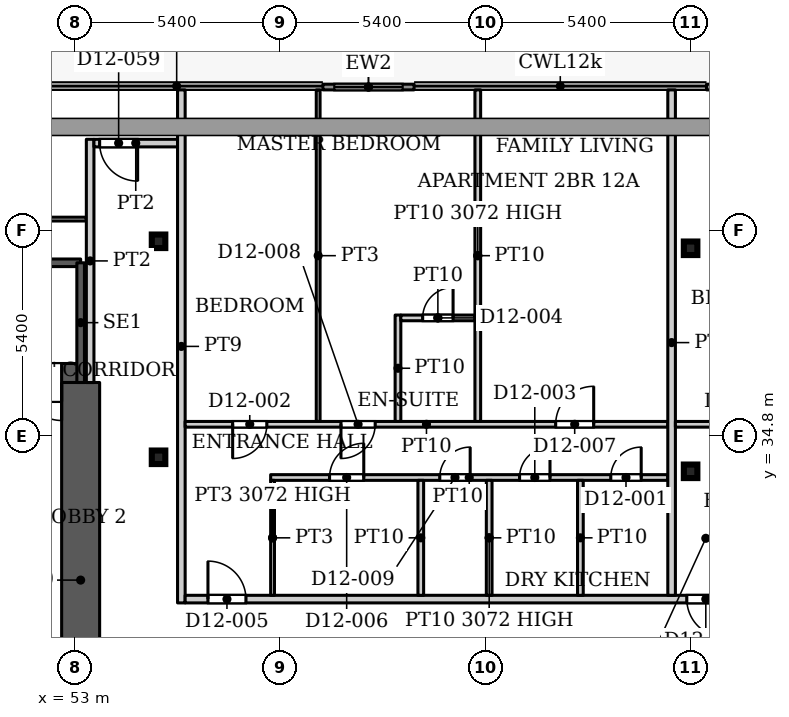
"""IFC4 building model, lengths in metres.
Left out: names, types, materials, properties, quantities, classifications, styles, units other than length and angle.
Written with IfcOpenShell. Run it as: python <this file> out.ifc"""

import sys

from ifc_helpers import new_model, si_unit, direction, frame, frame_2d, origin, origin_2d, place, context, subcontext, project, spatial, rectangle, hollow_rectangle, extrude, source, transform, mapped, element, fill, save


model = new_model("IFC4")
c1 = context("Model", 3, precision=1e-05, world=origin(), true_north=direction((0.0, 1.0)))
c2 = subcontext(c1, "Body", "Model", "MODEL_VIEW")
j1 = project(units=[si_unit("LENGTHUNIT", "METRE"), si_unit("PLANEANGLEUNIT", "RADIAN")], contexts=[c1])
p1 = place(None, origin())
s1 = spatial("IfcSite", under=j1, at=p1, CompositionType="ELEMENT")
p2 = place(p1, origin())
s2 = spatial("IfcBuilding", under=s1, at=p2, CompositionType="ELEMENT")
p3 = place(p2, frame((0.0, 0.0, 53.9)))
s3 = spatial("IfcBuildingStorey", under=s2, at=p3, CompositionType="ELEMENT", Elevation=53.9)
for number, where, z_axis, x_axis in (
    (1, (69.2, 33.863, 0.0), (0.0, 0.0, 1.0), (1.0, 0.0, 0.0)),
    (2, (55.2, 34.232, 0.0), (0.0, 0.0, 1.0), (1.0, 0.0, 0.0)),
    (3, (69.2, 39.732, 0.0), (0.0, 0.0, 1.0), (1.0, 0.0, 0.0)),
    (4, (55.2, 39.916, 0.0), (0.0, 0.0, 1.0), (1.0, 0.0, 0.0)),
):
    element("IfcColumn", number, at=place(p3, frame(where, z_axis=z_axis, x_axis=x_axis)), inside=s3, PredefinedType="COLUMN", context=c2, shape_type="SweptSolid", body=[
        extrude(hollow_rectangle(XDim=0.356, YDim=0.356, WallThickness=0.016, InnerFilletRadius=0.016, OuterFilletRadius=0.032, at=origin_2d()), origin(), (0.0, 0.0, 1.0), 3.9),
    ])
p4 = place(p3, frame((34.75, 36.2, 0.0), z_axis=(0.0, 0.0, 1.0), x_axis=(1.0, 0.0, 0.0)))
e5 = element("IfcWall", 5, at=p4, inside=s3, PredefinedType="SHEAR", context=c2, shape_type="SweptSolid", body=[
    extrude(rectangle(XDim=18.4, YDim=1.0, at=frame_2d((9.2, 0.0))), origin(), (0.0, 0.0, 1.0), 3.9),
])
p5 = place(p4, frame((16.9, 0.0, 0.0)))
e6 = element("IfcOpeningElement", 6, at=p5, cuts=e5, PredefinedType="OPENING", context=c2, shape_type="SweptSolid", body=[
    extrude(rectangle(XDim=1.0, YDim=2.2, at=frame_2d((0.5, 1.1))), frame((0.0, 0.51, 0.0), z_axis=(0.0, -1.0, 0.0), x_axis=(1.0, 0.0, 0.0)), (0.0, 0.0, 1.0), 1.02),
])
p6 = place(p3, frame((53.15, 25.8, 0.0), z_axis=(0.0, 0.0, 1.0), x_axis=(0.0, 1.0, 0.0)))
e7 = element("IfcWall", 7, at=p6, inside=s3, PredefinedType="SHEAR", context=c2, shape_type="SweptSolid", body=[
    extrude(rectangle(XDim=10.4, YDim=1.0, at=frame_2d((5.2, 0.0))), origin(), (0.0, 0.0, 1.0), 3.9),
])
p7 = place(p3, frame((59.524, 43.975, 0.0), z_axis=(0.0, 0.0, 1.0), x_axis=(1.0, 0.0, 0.0)))
e8 = element("IfcWall", 8, at=p7, inside=s3, PredefinedType="SOLIDWALL", context=c2, shape_type="SweptSolid", body=[
    extrude(rectangle(XDim=2.4, YDim=0.15, at=frame_2d((1.2, 0.0))), origin(), (0.0, 0.0, 1.0), 3.75),
])
p8 = place(p7, frame((0.3, 0.0, 0.0)))
e9 = element("IfcOpeningElement", 9, at=p8, cuts=e8, PredefinedType="OPENING", context=c2, shape_type="SweptSolid", body=[
    extrude(rectangle(XDim=1.8, YDim=2.4, at=frame_2d((0.9, 1.2))), frame((0.0, 0.085, 0.0), z_axis=(0.0, -1.0, 0.0), x_axis=(1.0, 0.0, 0.0)), (0.0, 0.0, 1.0), 0.17),
])
p9 = place(p3, frame((69.618, 43.975, 0.0), z_axis=(0.0, 0.0, 1.0), x_axis=(1.0, 0.0, 0.0)))
e10 = element("IfcWall", 10, at=p9, inside=s3, PredefinedType="SOLIDWALL", context=c2, shape_type="SweptSolid", body=[
    extrude(rectangle(XDim=2.4, YDim=0.15, at=frame_2d((1.2, 0.0))), origin(), (0.0, 0.0, 1.0), 3.75),
])
p10 = place(p9, frame((0.3, 0.0, 0.0)))
e11 = element("IfcOpeningElement", 11, at=p10, cuts=e10, PredefinedType="OPENING", context=c2, shape_type="SweptSolid", body=[
    extrude(rectangle(XDim=1.8, YDim=2.4, at=frame_2d((0.9, 1.2))), frame((0.0, 0.085, 0.0), z_axis=(0.0, -1.0, 0.0), x_axis=(1.0, 0.0, 0.0)), (0.0, 0.0, 1.0), 0.17),
])
p11 = place(p3, frame((43.99, 39.35, 0.0), z_axis=(0.0, 0.0, 1.0), x_axis=(1.0, 0.0, 0.0)))
e12 = element("IfcWall", 12, at=p11, inside=s3, PredefinedType="SHEAR", context=c2, shape_type="SweptSolid", body=[
    extrude(rectangle(XDim=9.16, YDim=0.2, at=frame_2d((4.58, 0.0))), origin(), (0.0, 0.0, 1.0), 3.9),
])
p12 = place(p3, frame((53.15, 36.2, 0.0), z_axis=(0.0, 0.0, 1.0), x_axis=(0.0, 1.0, 0.0)))
e13 = element("IfcWall", 13, at=p12, inside=s3, PredefinedType="SHEAR", context=c2, shape_type="SweptSolid", body=[
    extrude(rectangle(XDim=3.15, YDim=0.2, at=frame_2d((1.575, 0.0))), origin(), (0.0, 0.0, 1.0), 3.9),
])
p13 = place(p3, frame((38.499, 40.5, 0.0), z_axis=(0.0, 0.0, 1.0), x_axis=(1.0, 0.0, 0.0)))
e14 = element("IfcWall", 14, at=p13, inside=s3, PredefinedType="PARTITIONING", context=c2, shape_type="SweptSolid", body=[
    extrude(rectangle(XDim=14.801, YDim=0.1, at=frame_2d((7.4, 0.0))), origin(), (0.0, 0.0, 1.0), 3.6),
])
p14 = place(p13, frame((6.701, 0.0, 0.0)))
e15 = element("IfcOpeningElement", 15, at=p14, cuts=e14, PredefinedType="OPENING", context=c2, shape_type="SweptSolid", body=[
    extrude(rectangle(XDim=1.0, YDim=2.1, at=frame_2d((0.5, 1.05))), frame((0.0, 0.06, 0.0), z_axis=(0.0, -1.0, 0.0), x_axis=(1.0, 0.0, 0.0)), (0.0, 0.0, 1.0), 0.12),
])
p15 = place(p3, frame((53.4, 36.199, 0.0), z_axis=(0.0, 0.0, 1.0), x_axis=(0.0, 1.0, 0.0)))
e16 = element("IfcWall", 16, at=p15, inside=s3, PredefinedType="PARTITIONING", context=c2, shape_type="SweptSolid", body=[
    extrude(rectangle(XDim=6.401, YDim=0.2, at=frame_2d((3.201, 0.0))), origin(), (0.0, 0.0, 1.0), 3.6),
])
p16 = place(p3, frame((53.5, 42.5, 0.0), z_axis=(0.0, 0.0, 1.0), x_axis=(1.0, 0.0, 0.0)))
e17 = element("IfcWall", 17, at=p16, inside=s3, PredefinedType="PARTITIONING", context=c2, shape_type="SweptSolid", body=[
    extrude(rectangle(XDim=2.2, YDim=0.2, at=frame_2d((1.1, 0.0))), origin(), (0.0, 0.0, 1.0), 3.6),
])
p17 = place(p16, frame((0.15, 0.0, 0.0)))
e18 = element("IfcOpeningElement", 18, at=p17, cuts=e17, PredefinedType="OPENING", context=c2, shape_type="SweptSolid", body=[
    extrude(rectangle(XDim=1.0, YDim=2.1, at=frame_2d((0.5, 1.05))), frame((0.0, 0.11, 0.0), z_axis=(0.0, -1.0, 0.0), x_axis=(1.0, 0.0, 0.0)), (0.0, 0.0, 1.0), 0.22),
])
p18 = place(p3, frame((55.8, 30.4, 0.0), z_axis=(0.0, 0.0, 1.0), x_axis=(0.0, 1.0, 0.0)))
e19 = element("IfcWall", 19, at=p18, inside=s3, PredefinedType="PARTITIONING", context=c2, shape_type="SweptSolid", body=[
    extrude(rectangle(XDim=13.5, YDim=0.2, at=frame_2d((6.75, 0.0))), origin(), (0.0, 0.0, 1.0), 3.6),
])
p19 = place(p3, frame((55.9, 30.5, 0.0), z_axis=(0.0, 0.0, 1.0), x_axis=(1.0, 0.0, 0.0)))
e20 = element("IfcWall", 20, at=p19, inside=s3, PredefinedType="PARTITIONING", context=c2, shape_type="SweptSolid", body=[
    extrude(rectangle(XDim=42.2, YDim=0.2, at=frame_2d((21.1, 0.0))), origin(), (0.0, 0.0, 1.0), 3.6),
])
p20 = place(p19, frame((0.6, 0.0, 0.0)))
e21 = element("IfcOpeningElement", 21, at=p20, cuts=e20, PredefinedType="OPENING", context=c2, shape_type="SweptSolid", body=[
    extrude(rectangle(XDim=1.0, YDim=2.1, at=frame_2d((0.5, 1.05))), frame((0.0, 0.11, 0.0), z_axis=(0.0, -1.0, 0.0), x_axis=(1.0, 0.0, 0.0)), (0.0, 0.0, 1.0), 0.22),
])
p21 = place(p19, frame((13.2, 0.0, 0.0)))
e22 = element("IfcOpeningElement", 22, at=p21, cuts=e20, PredefinedType="OPENING", context=c2, shape_type="SweptSolid", body=[
    extrude(rectangle(XDim=1.0, YDim=2.1, at=frame_2d((0.5, 1.05))), frame((0.0, 0.11, 0.0), z_axis=(0.0, -1.0, 0.0), x_axis=(1.0, 0.0, 0.0)), (0.0, 0.0, 1.0), 0.22),
])
p22 = place(p19, frame((22.8, 0.0, 0.0)))
e23 = element("IfcOpeningElement", 23, at=p22, cuts=e20, PredefinedType="OPENING", context=c2, shape_type="SweptSolid", body=[
    extrude(rectangle(XDim=1.0, YDim=2.1, at=frame_2d((0.5, 1.05))), frame((0.0, 0.11, 0.0), z_axis=(0.0, -1.0, 0.0), x_axis=(1.0, 0.0, 0.0)), (0.0, 0.0, 1.0), 0.22),
])
p23 = place(p19, frame((34.65, 0.0, 0.0)))
e24 = element("IfcOpeningElement", 24, at=p23, cuts=e20, PredefinedType="OPENING", context=c2, shape_type="SweptSolid", body=[
    extrude(rectangle(XDim=1.0, YDim=2.1, at=frame_2d((0.5, 1.05))), frame((0.0, 0.11, 0.0), z_axis=(0.0, -1.0, 0.0), x_axis=(1.0, 0.0, 0.0)), (0.0, 0.0, 1.0), 0.22),
])
p24 = place(p3, frame((55.9, 35.1, 0.0), z_axis=(0.0, 0.0, 1.0), x_axis=(1.0, 0.0, 0.0)))
e25 = element("IfcWall", 25, at=p24, inside=s3, PredefinedType="PARTITIONING", context=c2, shape_type="SweptSolid", body=[
    extrude(rectangle(XDim=12.7, YDim=0.15, at=frame_2d((6.35, 0.0))), origin(), (0.0, 0.0, 1.0), 3.6),
])
p25 = place(p24, frame((1.25, 0.0, 0.0)))
e26 = element("IfcOpeningElement", 26, at=p25, cuts=e25, PredefinedType="OPENING", context=c2, shape_type="SweptSolid", body=[
    extrude(rectangle(XDim=0.9, YDim=2.1, at=frame_2d((0.45, 1.05))), frame((0.0, 0.085, 0.0), z_axis=(0.0, -1.0, 0.0), x_axis=(1.0, 0.0, 0.0)), (0.0, 0.0, 1.0), 0.17),
])
p26 = place(p24, frame((9.75, 0.0, 0.0)))
e27 = element("IfcOpeningElement", 27, at=p26, cuts=e25, PredefinedType="OPENING", context=c2, shape_type="SweptSolid", body=[
    extrude(rectangle(XDim=1.0, YDim=2.1, at=frame_2d((0.5, 1.05))), frame((0.0, 0.085, 0.0), z_axis=(0.0, -1.0, 0.0), x_axis=(1.0, 0.0, 0.0)), (0.0, 0.0, 1.0), 0.17),
])
p27 = place(p24, frame((4.1, 0.0, 0.0)))
e28 = element("IfcOpeningElement", 28, at=p27, cuts=e25, PredefinedType="OPENING", context=c2, shape_type="SweptSolid", body=[
    extrude(rectangle(XDim=0.9, YDim=2.1, at=frame_2d((0.45, 1.05))), frame((0.0, 0.085, 0.0), z_axis=(0.0, -1.0, 0.0), x_axis=(1.0, 0.0, 0.0)), (0.0, 0.0, 1.0), 0.17),
])
p28 = place(p3, frame((58.15, 33.7, 0.0), z_axis=(0.0, 0.0, 1.0), x_axis=(1.0, 0.0, 0.0)))
e29 = element("IfcWall", 29, at=p28, inside=s3, PredefinedType="PARTITIONING", context=c2, shape_type="SweptSolid", body=[
    extrude(rectangle(XDim=10.45, YDim=0.15, at=frame_2d((5.225, 0.0))), origin(), (0.0, 0.0, 1.0), 3.6),
])
p29 = place(p28, frame((8.95, 0.0, 0.0)))
e30 = element("IfcOpeningElement", 30, at=p29, cuts=e29, PredefinedType="OPENING", context=c2, shape_type="SweptSolid", body=[
    extrude(rectangle(XDim=0.8, YDim=2.1, at=frame_2d((0.4, 1.05))), frame((0.0, 0.085, 0.0), z_axis=(0.0, -1.0, 0.0), x_axis=(1.0, 0.0, 0.0)), (0.0, 0.0, 1.0), 0.17),
])
p30 = place(p28, frame((6.55, 0.0, 0.0)))
e31 = element("IfcOpeningElement", 31, at=p30, cuts=e29, PredefinedType="OPENING", context=c2, shape_type="SweptSolid", body=[
    extrude(rectangle(XDim=0.8, YDim=2.1, at=frame_2d((0.4, 1.05))), frame((0.0, 0.085, 0.0), z_axis=(0.0, -1.0, 0.0), x_axis=(1.0, 0.0, 0.0)), (0.0, 0.0, 1.0), 0.17),
])
p31 = place(p28, frame((1.55, 0.0, 0.0)))
e32 = element("IfcOpeningElement", 32, at=p31, cuts=e29, PredefinedType="OPENING", context=c2, shape_type="SweptSolid", body=[
    extrude(rectangle(XDim=0.9, YDim=2.1, at=frame_2d((0.45, 1.05))), frame((0.0, 0.085, 0.0), z_axis=(0.0, -1.0, 0.0), x_axis=(1.0, 0.0, 0.0)), (0.0, 0.0, 1.0), 0.17),
])
p32 = place(p28, frame((4.45, 0.0, 0.0)))
e33 = element("IfcOpeningElement", 33, at=p32, cuts=e29, PredefinedType="OPENING", context=c2, shape_type="SweptSolid", body=[
    extrude(rectangle(XDim=0.8, YDim=2.1, at=frame_2d((0.4, 1.05))), frame((0.0, 0.085, 0.0), z_axis=(0.0, -1.0, 0.0), x_axis=(1.0, 0.0, 0.0)), (0.0, 0.0, 1.0), 0.17),
])
p33 = place(p3, frame((58.2, 30.6, 0.0), z_axis=(0.0, 0.0, 1.0), x_axis=(0.0, 1.0, 0.0)))
e34 = element("IfcWall", 34, at=p33, inside=s3, PredefinedType="PARTITIONING", context=c2, shape_type="SweptSolid", body=[
    extrude(rectangle(XDim=3.025, YDim=0.1, at=frame_2d((1.512, 0.0))), origin(), (0.0, 0.0, 1.0), 3.072),
])
p34 = place(p3, frame((59.4, 35.175, 0.0), z_axis=(0.0, 0.0, 1.0), x_axis=(0.0, 1.0, 0.0)))
e35 = element("IfcWall", 35, at=p34, inside=s3, PredefinedType="PARTITIONING", context=c2, shape_type="SweptSolid", body=[
    extrude(rectangle(XDim=8.725, YDim=0.1, at=frame_2d((4.362, 0.0))), origin(), (0.0, 0.0, 1.0), 3.6),
])
p35 = place(p3, frame((61.5, 35.175, 0.0), z_axis=(0.0, 0.0, 1.0), x_axis=(0.0, 1.0, 0.0)))
e36 = element("IfcWall", 36, at=p35, inside=s3, PredefinedType="PARTITIONING", context=c2, shape_type="SweptSolid", body=[
    extrude(rectangle(XDim=2.8, YDim=0.15, at=frame_2d((1.4, 0.0))), origin(), (0.0, 0.0, 1.0), 3.6),
])
p36 = place(p3, frame((61.575, 37.9, 0.0), z_axis=(0.0, 0.0, 1.0), x_axis=(1.0, 0.0, 0.0)))
e37 = element("IfcWall", 37, at=p36, inside=s3, PredefinedType="PARTITIONING", context=c2, shape_type="SweptSolid", body=[
    extrude(rectangle(XDim=1.95, YDim=0.15, at=frame_2d((0.975, 0.0))), origin(), (0.0, 0.0, 1.0), 3.6),
])
p37 = place(p36, frame((0.575, 0.0, 0.0)))
e38 = element("IfcOpeningElement", 38, at=p37, cuts=e37, PredefinedType="OPENING", context=c2, shape_type="SweptSolid", body=[
    extrude(rectangle(XDim=0.8, YDim=2.1, at=frame_2d((0.4, 1.05))), frame((0.0, 0.085, 0.0), z_axis=(0.0, -1.0, 0.0), x_axis=(1.0, 0.0, 0.0)), (0.0, 0.0, 1.0), 0.17),
])
p38 = place(p3, frame((62.1, 30.6, 0.0), z_axis=(0.0, 0.0, 1.0), x_axis=(0.0, 1.0, 0.0)))
e39 = element("IfcWall", 39, at=p38, inside=s3, PredefinedType="PARTITIONING", context=c2, shape_type="SweptSolid", body=[
    extrude(rectangle(XDim=3.025, YDim=0.15, at=frame_2d((1.512, 0.0))), origin(), (0.0, 0.0, 1.0), 3.6),
])
p39 = place(p3, frame((63.6, 35.175, 0.0), z_axis=(0.0, 0.0, 1.0), x_axis=(0.0, 1.0, 0.0)))
e40 = element("IfcWall", 40, at=p39, inside=s3, PredefinedType="PARTITIONING", context=c2, shape_type="SweptSolid", body=[
    extrude(rectangle(XDim=8.725, YDim=0.15, at=frame_2d((4.362, 0.0))), origin(), (0.0, 0.0, 1.0), 3.072),
])
p40 = place(p3, frame((63.9, 30.6, 0.0), z_axis=(0.0, 0.0, 1.0), x_axis=(0.0, 1.0, 0.0)))
e41 = element("IfcWall", 41, at=p40, inside=s3, PredefinedType="PARTITIONING", context=c2, shape_type="SweptSolid", body=[
    extrude(rectangle(XDim=3.025, YDim=0.15, at=frame_2d((1.512, 0.0))), origin(), (0.0, 0.0, 1.0), 3.072),
])
p41 = place(p3, frame((66.3, 30.6, 0.0), z_axis=(0.0, 0.0, 1.0), x_axis=(0.0, 1.0, 0.0)))
e42 = element("IfcWall", 42, at=p41, inside=s3, PredefinedType="PARTITIONING", context=c2, shape_type="SweptSolid", body=[
    extrude(rectangle(XDim=3.025, YDim=0.15, at=frame_2d((1.512, 0.0))), origin(), (0.0, 0.0, 1.0), 3.6),
])
p42 = place(p3, frame((68.7, 30.6, 0.0), z_axis=(0.0, 0.0, 1.0), x_axis=(0.0, 1.0, 0.0)))
e43 = element("IfcWall", 43, at=p42, inside=s3, PredefinedType="PARTITIONING", context=c2, shape_type="SweptSolid", body=[
    extrude(rectangle(XDim=13.3, YDim=0.2, at=frame_2d((6.65, 0.0))), origin(), (0.0, 0.0, 1.0), 3.6),
])
p43 = place(p3, frame((68.8, 35.1, 0.0), z_axis=(0.0, 0.0, 1.0), x_axis=(1.0, 0.0, 0.0)))
e44 = element("IfcWall", 44, at=p43, inside=s3, PredefinedType="PARTITIONING", context=c2, shape_type="SweptSolid", body=[
    extrude(rectangle(XDim=9.1, YDim=0.15, at=frame_2d((4.55, 0.0))), origin(), (0.0, 0.0, 1.0), 3.6),
])
p44 = place(p43, frame((1.4, 0.0, 0.0)))
e45 = element("IfcOpeningElement", 45, at=p44, cuts=e44, PredefinedType="OPENING", context=c2, shape_type="SweptSolid", body=[
    extrude(rectangle(XDim=0.9, YDim=2.1, at=frame_2d((0.45, 1.05))), frame((0.0, 0.085, 0.0), z_axis=(0.0, -1.0, 0.0), x_axis=(1.0, 0.0, 0.0)), (0.0, 0.0, 1.0), 0.17),
])
p45 = place(p43, frame((6.0, 0.0, 0.0)))
e46 = element("IfcOpeningElement", 46, at=p45, cuts=e44, PredefinedType="OPENING", context=c2, shape_type="SweptSolid", body=[
    extrude(rectangle(XDim=1.0, YDim=2.1, at=frame_2d((0.5, 1.05))), frame((0.0, 0.085, 0.0), z_axis=(0.0, -1.0, 0.0), x_axis=(1.0, 0.0, 0.0)), (0.0, 0.0, 1.0), 0.17),
])
m1 = source(origin(), c2, "Body", "SweptSolid", [
    extrude(rectangle(XDim=1.8, YDim=2.4, at=frame_2d((0.9, 1.2))), frame((0.0, 0.025, 0.0), z_axis=(0.0, -1.0, 0.0), x_axis=(1.0, 0.0, 0.0)), (0.0, 0.0, 1.0), 0.05),
])
p46 = place(p8, origin())
e47 = element("IfcDoor", 47, at=p46, inside=s3, OperationType="SLIDING_TO_LEFT", PredefinedType="DOOR", context=c2, shape_type="MappedRepresentation", body=[
    mapped(m1, transform((0.0, 0.0, 0.0), x_axis=(1.0, 0.0, 0.0), y_axis=(0.0, 1.0, 0.0), z_axis=(0.0, 0.0, 1.0), scale=1.0)),
])
fill(e9, e47)
m2 = source(origin(), c2, "Body", "SweptSolid", [
    extrude(rectangle(XDim=1.0, YDim=2.2, at=frame_2d((0.5, 1.1))), frame((0.0, 0.025, 0.0), z_axis=(0.0, -1.0, 0.0), x_axis=(1.0, 0.0, 0.0)), (0.0, 0.0, 1.0), 0.05),
])
p47 = place(p5, origin())
e48 = element("IfcDoor", 48, at=p47, inside=s3, OperationType="SINGLE_SWING_RIGHT", PredefinedType="DOOR", context=c2, shape_type="MappedRepresentation", body=[
    mapped(m2, transform((0.0, 0.0, 0.0), x_axis=(1.0, 0.0, 0.0), y_axis=(0.0, 1.0, 0.0), z_axis=(0.0, 0.0, 1.0), scale=1.0)),
])
fill(e6, e48)
m3 = source(origin(), c2, "Body", "SweptSolid", [
    extrude(rectangle(XDim=0.8, YDim=2.1, at=frame_2d((0.4, 1.05))), frame((0.0, 0.025, 0.0), z_axis=(0.0, -1.0, 0.0), x_axis=(1.0, 0.0, 0.0)), (0.0, 0.0, 1.0), 0.05),
])
p48 = place(p29, origin())
e49 = element("IfcDoor", 49, at=p48, inside=s3, OperationType="SINGLE_SWING_LEFT", PredefinedType="DOOR", context=c2, shape_type="MappedRepresentation", body=[
    mapped(m3, transform((0.0, 0.0, 0.0), x_axis=(1.0, 0.0, 0.0), y_axis=(0.0, 1.0, 0.0), z_axis=(0.0, 0.0, 1.0), scale=1.0)),
])
fill(e30, e49)
m4 = source(origin(), c2, "Body", "SweptSolid", [
    extrude(rectangle(XDim=0.9, YDim=2.1, at=frame_2d((0.45, 1.05))), frame((0.0, 0.025, 0.0), z_axis=(0.0, -1.0, 0.0), x_axis=(1.0, 0.0, 0.0)), (0.0, 0.0, 1.0), 0.05),
])
p49 = place(p25, origin())
e50 = element("IfcDoor", 50, at=p49, inside=s3, OperationType="SINGLE_SWING_RIGHT", PredefinedType="DOOR", context=c2, shape_type="MappedRepresentation", body=[
    mapped(m4, transform((0.0, 0.0, 0.0), x_axis=(1.0, 0.0, 0.0), y_axis=(0.0, 1.0, 0.0), z_axis=(0.0, 0.0, 1.0), scale=1.0)),
])
fill(e26, e50)
p50 = place(p30, origin())
e51 = element("IfcDoor", 51, at=p50, inside=s3, OperationType="SINGLE_SWING_LEFT", PredefinedType="DOOR", context=c2, shape_type="MappedRepresentation", body=[
    mapped(m3, transform((0.0, 0.0, 0.0), x_axis=(1.0, 0.0, 0.0), y_axis=(0.0, 1.0, 0.0), z_axis=(0.0, 0.0, 1.0), scale=1.0)),
])
fill(e31, e51)
p51 = place(p37, origin())
e52 = element("IfcDoor", 52, at=p51, inside=s3, OperationType="SINGLE_SWING_LEFT", PredefinedType="DOOR", context=c2, shape_type="MappedRepresentation", body=[
    mapped(m3, transform((0.0, 0.0, 0.0), x_axis=(1.0, 0.0, 0.0), y_axis=(0.0, 1.0, 0.0), z_axis=(0.0, 0.0, 1.0), scale=1.0)),
])
fill(e38, e52)
m5 = source(origin(), c2, "Body", "SweptSolid", [
    extrude(rectangle(XDim=1.0, YDim=2.1, at=frame_2d((0.5, 1.05))), frame((0.0, 0.025, 0.0), z_axis=(0.0, -1.0, 0.0), x_axis=(1.0, 0.0, 0.0)), (0.0, 0.0, 1.0), 0.05),
])
p52 = place(p20, origin())
e53 = element("IfcDoor", 53, at=p52, inside=s3, OperationType="SINGLE_SWING_LEFT", PredefinedType="DOOR", context=c2, shape_type="MappedRepresentation", body=[
    mapped(m5, transform((0.0, 0.0, 0.0), x_axis=(1.0, 0.0, 0.0), y_axis=(0.0, 1.0, 0.0), z_axis=(0.0, 0.0, 1.0), scale=1.0)),
])
fill(e21, e53)
p53 = place(p31, origin())
e54 = element("IfcDoor", 54, at=p53, inside=s3, OperationType="SINGLE_SWING_LEFT", PredefinedType="DOOR", context=c2, shape_type="MappedRepresentation", body=[
    mapped(m4, transform((0.0, 0.0, 0.0), x_axis=(1.0, 0.0, 0.0), y_axis=(0.0, 1.0, 0.0), z_axis=(0.0, 0.0, 1.0), scale=1.0)),
])
fill(e32, e54)
m6 = source(origin(), c2, "Body", "SweptSolid", [
    extrude(rectangle(XDim=1.0, YDim=2.1, at=frame_2d((0.5, 1.05))), frame((0.0, 0.025, 0.0), z_axis=(0.0, -1.0, 0.0), x_axis=(1.0, 0.0, 0.0)), (0.0, 0.0, 1.0), 0.05),
])
p54 = place(p26, origin())
e55 = element("IfcDoor", 55, at=p54, inside=s3, OperationType="SINGLE_SWING_LEFT", PredefinedType="DOOR", context=c2, shape_type="MappedRepresentation", body=[
    mapped(m6, transform((0.0, 0.0, 0.0), x_axis=(1.0, 0.0, 0.0), y_axis=(0.0, 1.0, 0.0), z_axis=(0.0, 0.0, 1.0), scale=1.0)),
])
fill(e27, e55)
p55 = place(p27, origin())
e56 = element("IfcDoor", 56, at=p55, inside=s3, OperationType="SINGLE_SWING_RIGHT", PredefinedType="DOOR", context=c2, shape_type="MappedRepresentation", body=[
    mapped(m4, transform((0.0, 0.0, 0.0), x_axis=(1.0, 0.0, 0.0), y_axis=(0.0, 1.0, 0.0), z_axis=(0.0, 0.0, 1.0), scale=1.0)),
])
fill(e28, e56)
p56 = place(p32, origin())
e57 = element("IfcDoor", 57, at=p56, inside=s3, OperationType="SINGLE_SWING_LEFT", PredefinedType="DOOR", context=c2, shape_type="MappedRepresentation", body=[
    mapped(m3, transform((0.0, 0.0, 0.0), x_axis=(1.0, 0.0, 0.0), y_axis=(0.0, 1.0, 0.0), z_axis=(0.0, 0.0, 1.0), scale=1.0)),
])
fill(e33, e57)
p57 = place(p21, origin())
e58 = element("IfcDoor", 58, at=p57, inside=s3, OperationType="SINGLE_SWING_RIGHT", PredefinedType="DOOR", context=c2, shape_type="MappedRepresentation", body=[
    mapped(m5, transform((0.0, 0.0, 0.0), x_axis=(1.0, 0.0, 0.0), y_axis=(0.0, 1.0, 0.0), z_axis=(0.0, 0.0, 1.0), scale=1.0)),
])
fill(e22, e58)
m7 = source(origin(), c2, "Body", "SweptSolid", [
    extrude(rectangle(XDim=1.0, YDim=2.1, at=frame_2d((0.5, 1.05))), frame((0.0, 0.025, 0.0), z_axis=(0.0, -1.0, 0.0), x_axis=(1.0, 0.0, 0.0)), (0.0, 0.0, 1.0), 0.05),
])
p58 = place(p17, origin())
e59 = element("IfcDoor", 59, at=p58, inside=s3, OperationType="SINGLE_SWING_RIGHT", PredefinedType="DOOR", context=c2, shape_type="MappedRepresentation", body=[
    mapped(m7, transform((0.0, 0.0, 0.0), x_axis=(1.0, 0.0, 0.0), y_axis=(0.0, 1.0, 0.0), z_axis=(0.0, 0.0, 1.0), scale=1.0)),
])
fill(e18, e59)
save(model, sys.argv[1])
